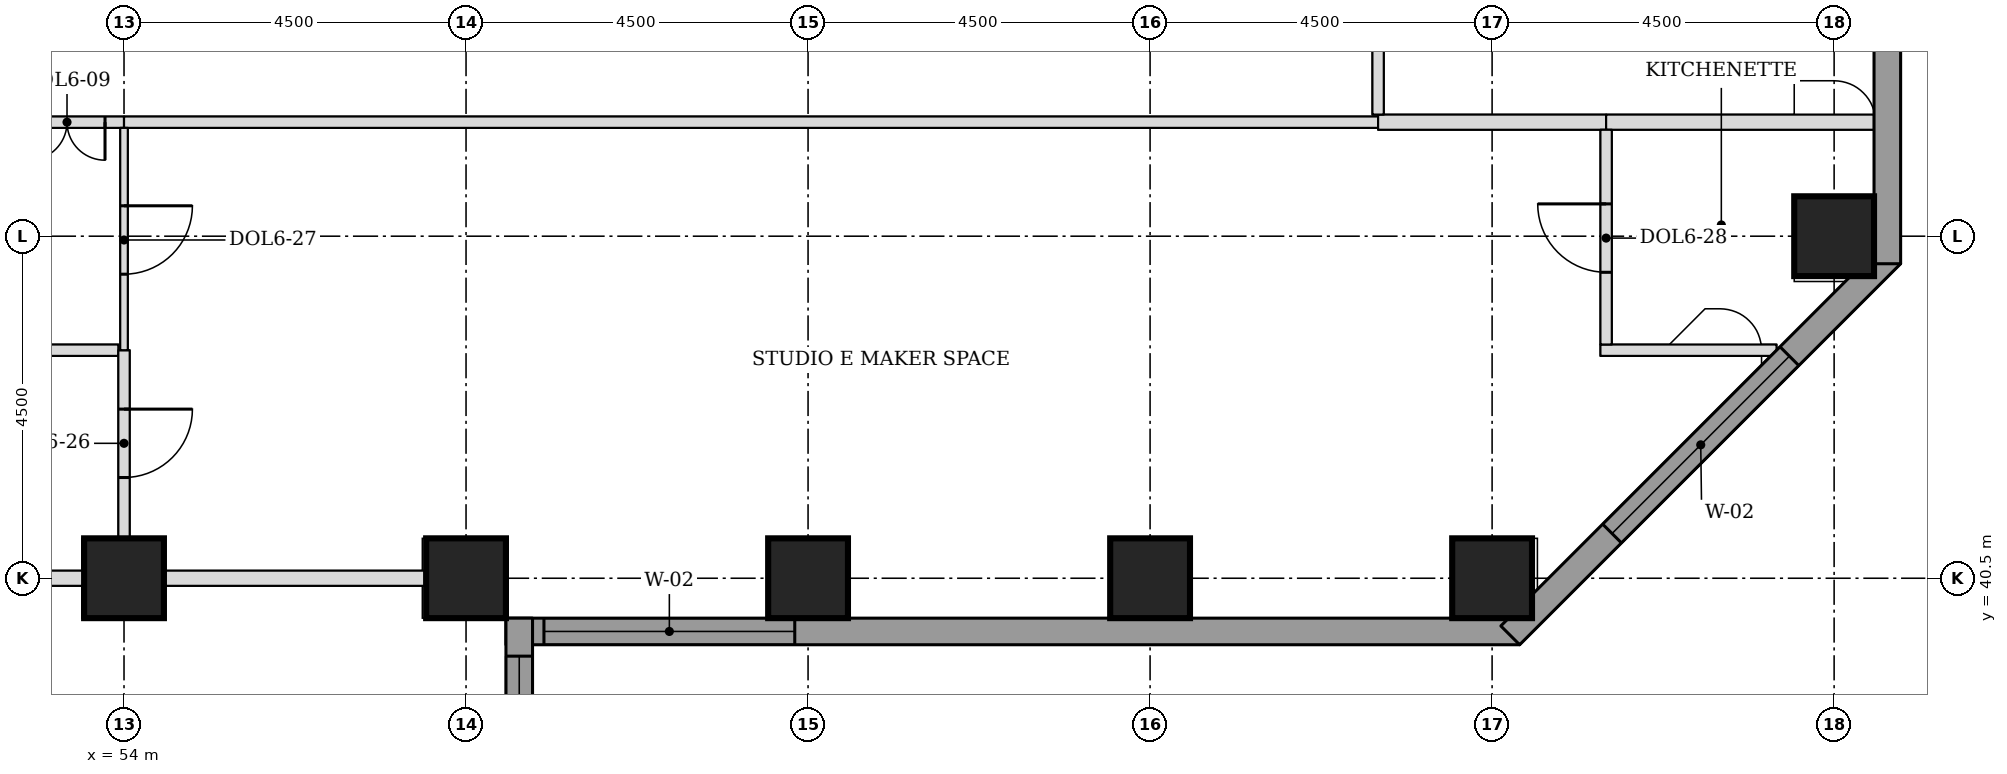
"""IFC4 building model, lengths in metres.
Left out: names, types, materials, properties, quantities, classifications, styles, units other than length and angle.
Written with IfcOpenShell. Run it as: python <this file> out.ifc"""

import sys

from ifc_helpers import new_model, si_unit, direction, frame, frame_2d, origin, origin_2d, place, context, subcontext, project, spatial, rectangle, extrude, element, fill, save


model = new_model("IFC4")
c1 = context("Model", 3, precision=1e-05, world=origin(), true_north=direction((0.0, 1.0)))
c2 = subcontext(c1, "Body", "Model", "MODEL_VIEW")
j1 = project(units=[si_unit("LENGTHUNIT", "METRE"), si_unit("PLANEANGLEUNIT", "RADIAN")], contexts=[c1])
p1 = place(None, origin())
s1 = spatial("IfcSite", under=j1, at=p1, CompositionType="ELEMENT")
p2 = place(p1, origin())
s2 = spatial("IfcBuilding", under=s1, at=p2, CompositionType="ELEMENT")
p3 = place(p2, frame((0.0, 0.0, 115.9)))
s3 = spatial("IfcBuildingStorey", under=s2, at=p3, CompositionType="ELEMENT", Elevation=115.9)
for number, where, z_axis, x_axis in (
    (1, (54.0, 40.5, 0.0), (0.0, 0.0, 1.0), (1.0, 0.0, 0.0)),
    (2, (58.5, 40.5, 0.0), (0.0, 0.0, 1.0), (1.0, 0.0, 0.0)),
    (3, (63.0, 40.5, 0.0), (0.0, 0.0, 1.0), (1.0, 0.0, 0.0)),
    (4, (67.5, 40.5, 0.0), (0.0, 0.0, 1.0), (1.0, 0.0, 0.0)),
    (5, (72.0, 40.5, 0.0), (0.0, 0.0, 1.0), (1.0, 0.0, 0.0)),
    (6, (76.5, 45.0, 0.0), (0.0, 0.0, 1.0), (1.0, 0.0, 0.0)),
):
    element("IfcColumn", number, at=place(p3, frame(where, z_axis=z_axis, x_axis=x_axis)), inside=s3, PredefinedType="COLUMN", context=c2, shape_type="SweptSolid", body=[
        extrude(rectangle(XDim=1.05, YDim=1.05, at=origin_2d()), origin(), (0.0, 0.0, 1.0), 3.7),
    ])
p4 = place(p3, frame((59.025, 39.8, 0.0), z_axis=(0.0, 0.0, 1.0), x_axis=(1.0, 0.0, 0.0)))
e7 = element("IfcWall", 7, at=p4, inside=s3, PredefinedType="STANDARD", context=c2, shape_type="SweptSolid", body=[
    extrude(rectangle(XDim=13.337, YDim=0.35, at=frame_2d((6.669, 0.0))), origin(), (0.0, 0.0, 1.0), 3.525),
])
p5 = place(p4, frame((0.5, 0.0, 0.9)))
e8 = element("IfcOpeningElement", 8, at=p5, cuts=e7, PredefinedType="OPENING", context=c2, shape_type="SweptSolid", body=[
    extrude(rectangle(XDim=3.3, YDim=1.9, at=frame_2d((1.65, 0.95))), frame((0.0, 0.185, 0.0), z_axis=(0.0, -1.0, 0.0), x_axis=(1.0, 0.0, 0.0)), (0.0, 0.0, 1.0), 0.37),
])
p6 = place(p3, frame((72.239, 39.749, 0.0), z_axis=(0.0, 0.0, 1.0), x_axis=(0.707106781187, 0.707106781187, 0.0)))
e9 = element("IfcWall", 9, at=p6, inside=s3, PredefinedType="STANDARD", context=c2, shape_type="SweptSolid", body=[
    extrude(rectangle(XDim=7.089, YDim=0.35, at=frame_2d((3.544, 0.0))), origin(), (0.0, 0.0, 1.0), 3.525),
])
p7 = place(p6, frame((1.894, 0.0, 0.9)))
e10 = element("IfcOpeningElement", 10, at=p7, cuts=e9, PredefinedType="OPENING", context=c2, shape_type="SweptSolid", body=[
    extrude(rectangle(XDim=3.3, YDim=1.9, at=frame_2d((1.65, 0.95))), frame((0.0, 0.185, 0.0), z_axis=(0.0, -1.0, 0.0), x_axis=(1.0, 0.0, 0.0)), (0.0, 0.0, 1.0), 0.37),
])
p8 = place(p3, frame((77.2, 44.638, 0.0), z_axis=(0.0, 0.0, 1.0), x_axis=(0.0, 1.0, 0.0)))
e11 = element("IfcWall", 11, at=p8, inside=s3, PredefinedType="STANDARD", context=c2, shape_type="SweptSolid", body=[
    extrude(rectangle(XDim=32.225, YDim=0.35, at=frame_2d((16.112, 0.0))), origin(), (0.0, 0.0, 1.0), 3.525),
])
p9 = place(p8, frame((5.462, 0.0, 0.9)))
e12 = element("IfcOpeningElement", 12, at=p9, cuts=e11, PredefinedType="OPENING", context=c2, shape_type="SweptSolid", body=[
    extrude(rectangle(XDim=3.3, YDim=1.9, at=frame_2d((1.65, 0.95))), frame((0.0, 0.185, 0.0), z_axis=(0.0, -1.0, 0.0), x_axis=(1.0, 0.0, 0.0)), (0.0, 0.0, 1.0), 0.37),
])
p10 = place(p8, frame((9.962, 0.0, 0.9)))
e13 = element("IfcOpeningElement", 13, at=p10, cuts=e11, PredefinedType="OPENING", context=c2, shape_type="SweptSolid", body=[
    extrude(rectangle(XDim=3.3, YDim=1.9, at=frame_2d((1.65, 0.95))), frame((0.0, 0.185, 0.0), z_axis=(0.0, -1.0, 0.0), x_axis=(1.0, 0.0, 0.0)), (0.0, 0.0, 1.0), 0.37),
])
p11 = place(p8, frame((14.462, 0.0, 0.9)))
e14 = element("IfcOpeningElement", 14, at=p11, cuts=e11, PredefinedType="OPENING", context=c2, shape_type="SweptSolid", body=[
    extrude(rectangle(XDim=3.3, YDim=1.9, at=frame_2d((1.65, 0.95))), frame((0.0, 0.185, 0.0), z_axis=(0.0, -1.0, 0.0), x_axis=(1.0, 0.0, 0.0)), (0.0, 0.0, 1.0), 0.37),
])
p12 = place(p8, frame((18.962, 0.0, 0.9)))
e15 = element("IfcOpeningElement", 15, at=p12, cuts=e11, PredefinedType="OPENING", context=c2, shape_type="SweptSolid", body=[
    extrude(rectangle(XDim=3.3, YDim=1.9, at=frame_2d((1.65, 0.95))), frame((0.0, 0.185, 0.0), z_axis=(0.0, -1.0, 0.0), x_axis=(1.0, 0.0, 0.0)), (0.0, 0.0, 1.0), 0.37),
])
p13 = place(p8, frame((23.462, 0.0, 0.9)))
e16 = element("IfcOpeningElement", 16, at=p13, cuts=e11, PredefinedType="OPENING", context=c2, shape_type="SweptSolid", body=[
    extrude(rectangle(XDim=3.3, YDim=1.9, at=frame_2d((1.65, 0.95))), frame((0.0, 0.185, 0.0), z_axis=(0.0, -1.0, 0.0), x_axis=(1.0, 0.0, 0.0)), (0.0, 0.0, 1.0), 0.37),
])
p14 = place(p3, frame((59.2, 22.138, 0.0), z_axis=(0.0, 0.0, 1.0), x_axis=(0.0, 1.0, 0.0)))
e17 = element("IfcWall", 17, at=p14, inside=s3, PredefinedType="STANDARD", context=c2, shape_type="SweptSolid", body=[
    extrude(rectangle(XDim=17.837, YDim=0.35, at=frame_2d((8.919, 0.0))), origin(), (0.0, 0.0, 1.0), 3.525),
])
p15 = place(p14, frame((5.462, 0.0, 0.9)))
e18 = element("IfcOpeningElement", 18, at=p15, cuts=e17, PredefinedType="OPENING", context=c2, shape_type="SweptSolid", body=[
    extrude(rectangle(XDim=3.3, YDim=1.9, at=frame_2d((1.65, 0.95))), frame((0.0, 0.185, 0.0), z_axis=(0.0, -1.0, 0.0), x_axis=(1.0, 0.0, 0.0)), (0.0, 0.0, 1.0), 0.37),
])
p16 = place(p14, frame((14.037, 0.0, 0.9)))
e19 = element("IfcOpeningElement", 19, at=p16, cuts=e17, PredefinedType="OPENING", context=c2, shape_type="SweptSolid", body=[
    extrude(rectangle(XDim=3.3, YDim=1.9, at=frame_2d((1.65, 0.95))), frame((0.0, 0.185, 0.0), z_axis=(0.0, -1.0, 0.0), x_axis=(1.0, 0.0, 0.0)), (0.0, 0.0, 1.0), 0.37),
])
p17 = place(p3, frame((50.015, 40.5, 0.0), z_axis=(0.0, 0.0, 1.0), x_axis=(1.0, 0.0, 0.0)))
e20 = element("IfcWall", 20, at=p17, inside=s3, PredefinedType="PARTITIONING", context=c2, shape_type="SweptSolid", body=[
    extrude(rectangle(XDim=3.46, YDim=0.2, at=frame_2d((1.73, 0.0))), origin(), (0.0, 0.0, 1.0), 2.8),
])
p18 = place(p3, frame((54.495, 40.5, 0.0), z_axis=(0.0, 0.0, 1.0), x_axis=(1.0, 0.0, 0.0)))
e21 = element("IfcWall", 21, at=p18, inside=s3, PredefinedType="PARTITIONING", context=c2, shape_type="SweptSolid", body=[
    extrude(rectangle(XDim=3.48, YDim=0.2, at=frame_2d((1.74, 0.0))), origin(), (0.0, 0.0, 1.0), 2.8),
])
p19 = place(p3, frame((52.5, 43.5, 0.0), z_axis=(0.0, 0.0, 1.0), x_axis=(1.0, 0.0, 0.0)))
e22 = element("IfcWall", 22, at=p19, inside=s3, PredefinedType="PARTITIONING", context=c2, shape_type="SweptSolid", body=[
    extrude(rectangle(XDim=1.425, YDim=0.15, at=frame_2d((0.712, 0.0))), origin(), (0.0, 0.0, 1.0), 3.55),
])
p20 = place(p3, frame((73.425, 43.5, 0.0), z_axis=(0.0, 0.0, 1.0), x_axis=(1.0, 0.0, 0.0)))
e23 = element("IfcWall", 23, at=p20, inside=s3, PredefinedType="PARTITIONING", context=c2, shape_type="SweptSolid", body=[
    extrude(rectangle(XDim=2.317, YDim=0.15, at=frame_2d((1.159, 0.0))), origin(), (0.0, 0.0, 1.0), 3.55),
])
p21 = place(p3, frame((52.5, 46.5, 0.0), z_axis=(0.0, 0.0, 1.0), x_axis=(1.0, 0.0, 0.0)))
e24 = element("IfcWall", 24, at=p21, inside=s3, PredefinedType="PARTITIONING", context=c2, shape_type="SweptSolid", body=[
    extrude(rectangle(XDim=1.5, YDim=0.15, at=frame_2d((0.75, 0.0))), origin(), (0.0, 0.0, 1.0), 3.55),
])
p22 = place(p21, frame((0.25, 0.0, 0.0)))
e25 = element("IfcOpeningElement", 25, at=p22, cuts=e24, PredefinedType="OPENING", context=c2, shape_type="SweptSolid", body=[
    extrude(rectangle(XDim=1.0, YDim=2.1, at=frame_2d((0.5, 1.05))), frame((0.0, 0.085, 0.0), z_axis=(0.0, -1.0, 0.0), x_axis=(1.0, 0.0, 0.0)), (0.0, 0.0, 1.0), 0.17),
])
p23 = place(p3, frame((54.0, 46.5, 0.0), z_axis=(0.0, 0.0, 1.0), x_axis=(1.0, 0.0, 0.0)))
e26 = element("IfcWall", 26, at=p23, inside=s3, PredefinedType="PARTITIONING", context=c2, shape_type="SweptSolid", body=[
    extrude(rectangle(XDim=16.5, YDim=0.15, at=frame_2d((8.25, 0.0))), origin(), (0.0, 0.0, 1.0), 3.55),
])
p24 = place(p3, frame((70.5, 46.5, 0.0), z_axis=(0.0, 0.0, 1.0), x_axis=(1.0, 0.0, 0.0)))
e27 = element("IfcWall", 27, at=p24, inside=s3, PredefinedType="PARTITIONING", context=c2, shape_type="SweptSolid", body=[
    extrude(rectangle(XDim=3.0, YDim=0.2, at=frame_2d((1.5, 0.0))), origin(), (0.0, 0.0, 1.0), 3.55),
])
p25 = place(p3, frame((73.5, 46.5, 0.0), z_axis=(0.0, 0.0, 1.0), x_axis=(1.0, 0.0, 0.0)))
e28 = element("IfcWall", 28, at=p25, inside=s3, PredefinedType="PARTITIONING", context=c2, shape_type="SweptSolid", body=[
    extrude(rectangle(XDim=3.525, YDim=0.2, at=frame_2d((1.762, 0.0))), origin(), (0.0, 0.0, 1.0), 3.55),
])
p26 = place(p3, frame((54.0, 41.025, 0.0), z_axis=(0.0, 0.0, 1.0), x_axis=(0.0, 1.0, 0.0)))
e29 = element("IfcWall", 29, at=p26, inside=s3, PredefinedType="PARTITIONING", context=c2, shape_type="SweptSolid", body=[
    extrude(rectangle(XDim=2.475, YDim=0.15, at=frame_2d((1.238, 0.0))), origin(), (0.0, 0.0, 1.0), 3.55),
])
p27 = place(p26, frame((0.8, 0.0, 0.0)))
e30 = element("IfcOpeningElement", 30, at=p27, cuts=e29, PredefinedType="OPENING", context=c2, shape_type="SweptSolid", body=[
    extrude(rectangle(XDim=0.9, YDim=2.1, at=frame_2d((0.45, 1.05))), frame((0.0, 0.085, 0.0), z_axis=(0.0, -1.0, 0.0), x_axis=(1.0, 0.0, 0.0)), (0.0, 0.0, 1.0), 0.17),
])
p28 = place(p3, frame((54.0, 43.5, 0.0), z_axis=(0.0, 0.0, 1.0), x_axis=(0.0, 1.0, 0.0)))
e31 = element("IfcWall", 31, at=p28, inside=s3, PredefinedType="PARTITIONING", context=c2, shape_type="SweptSolid", body=[
    extrude(rectangle(XDim=2.925, YDim=0.1, at=frame_2d((1.462, 0.0))), origin(), (0.0, 0.0, 1.0), 3.55),
])
p29 = place(p28, frame((1.0, 0.0, 0.0)))
e32 = element("IfcOpeningElement", 32, at=p29, cuts=e31, PredefinedType="OPENING", context=c2, shape_type="SweptSolid", body=[
    extrude(rectangle(XDim=0.9, YDim=2.1, at=frame_2d((0.45, 1.05))), frame((0.0, 0.06, 0.0), z_axis=(0.0, -1.0, 0.0), x_axis=(1.0, 0.0, 0.0)), (0.0, 0.0, 1.0), 0.12),
])
p30 = place(p3, frame((73.5, 43.575, 0.0), z_axis=(0.0, 0.0, 1.0), x_axis=(0.0, 1.0, 0.0)))
e33 = element("IfcWall", 33, at=p30, inside=s3, PredefinedType="PARTITIONING", context=c2, shape_type="SweptSolid", body=[
    extrude(rectangle(XDim=2.825, YDim=0.15, at=frame_2d((1.413, 0.0))), origin(), (0.0, 0.0, 1.0), 3.55),
])
p31 = place(p30, frame((0.95, 0.0, 0.0)))
e34 = element("IfcOpeningElement", 34, at=p31, cuts=e33, PredefinedType="OPENING", context=c2, shape_type="SweptSolid", body=[
    extrude(rectangle(XDim=0.9, YDim=2.1, at=frame_2d((0.45, 1.05))), frame((0.0, 0.085, 0.0), z_axis=(0.0, -1.0, 0.0), x_axis=(1.0, 0.0, 0.0)), (0.0, 0.0, 1.0), 0.17),
])
p32 = place(p3, frame((70.5, 46.6, 0.0), z_axis=(0.0, 0.0, 1.0), x_axis=(0.0, 1.0, 0.0)))
e35 = element("IfcWall", 35, at=p32, inside=s3, PredefinedType="PARTITIONING", context=c2, shape_type="SweptSolid", body=[
    extrude(rectangle(XDim=13.4, YDim=0.15, at=frame_2d((6.7, 0.0))), origin(), (0.0, 0.0, 1.0), 3.55),
])
p33 = place(p32, frame((6.2, 0.0, 0.0)))
e36 = element("IfcOpeningElement", 36, at=p33, cuts=e35, PredefinedType="OPENING", context=c2, shape_type="SweptSolid", body=[
    extrude(rectangle(XDim=1.0, YDim=2.1, at=frame_2d((0.5, 1.05))), frame((0.0, 0.085, 0.0), z_axis=(0.0, -1.0, 0.0), x_axis=(1.0, 0.0, 0.0)), (0.0, 0.0, 1.0), 0.17),
])
p34 = place(p5, origin())
e37 = element("IfcWindow", 37, at=p34, inside=s3, PartitioningType="SINGLE_PANEL", PredefinedType="WINDOW", context=c2, shape_type="SweptSolid", body=[
    extrude(rectangle(XDim=3.3, YDim=1.9, at=frame_2d((1.65, 0.95))), frame((0.0, 0.085, 0.0), z_axis=(0.0, -1.0, 0.0), x_axis=(1.0, 0.0, 0.0)), (0.0, 0.0, 1.0), 0.06),
])
fill(e8, e37)
p35 = place(p7, origin())
e38 = element("IfcWindow", 38, at=p35, inside=s3, PartitioningType="SINGLE_PANEL", PredefinedType="WINDOW", context=c2, shape_type="SweptSolid", body=[
    extrude(rectangle(XDim=3.3, YDim=1.9, at=frame_2d((1.65, 0.95))), frame((0.0, 0.085, 0.0), z_axis=(0.0, -1.0, 0.0), x_axis=(1.0, 0.0, 0.0)), (0.0, 0.0, 1.0), 0.06),
])
fill(e10, e38)
p36 = place(p16, origin())
e39 = element("IfcWindow", 39, at=p36, inside=s3, PartitioningType="SINGLE_PANEL", PredefinedType="WINDOW", context=c2, shape_type="SweptSolid", body=[
    extrude(rectangle(XDim=3.3, YDim=1.9, at=frame_2d((1.65, 0.95))), frame((0.0, 0.085, 0.0), z_axis=(0.0, -1.0, 0.0), x_axis=(1.0, 0.0, 0.0)), (0.0, 0.0, 1.0), 0.06),
])
fill(e19, e39)
p37 = place(p22, frame((1.0, 0.0, 0.0), z_axis=(0.0, 0.0, 1.0), x_axis=(-1.0, 0.0, 0.0)))
e40 = element("IfcDoor", 40, at=p37, inside=s3, OperationType="DOUBLE_DOOR_SINGLE_SWING", PredefinedType="DOOR", context=c2, shape_type="SweptSolid", body=[
    extrude(rectangle(XDim=1.0, YDim=2.1, at=frame_2d((0.5, 1.05))), frame((0.0, 0.025, 0.0), z_axis=(0.0, -1.0, 0.0), x_axis=(1.0, 0.0, 0.0)), (0.0, 0.0, 1.0), 0.05),
])
fill(e25, e40)
p38 = place(p29, frame((0.9, 0.0, 0.0), z_axis=(0.0, 0.0, 1.0), x_axis=(-1.0, 0.0, 0.0)))
e41 = element("IfcDoor", 41, at=p38, inside=s3, OperationType="SINGLE_SWING_LEFT", PredefinedType="DOOR", context=c2, shape_type="SweptSolid", body=[
    extrude(rectangle(XDim=0.9, YDim=2.1, at=frame_2d((0.45, 1.05))), frame((0.0, 0.025, 0.0), z_axis=(0.0, -1.0, 0.0), x_axis=(1.0, 0.0, 0.0)), (0.0, 0.0, 1.0), 0.05),
])
fill(e32, e41)
p39 = place(p31, origin())
e42 = element("IfcDoor", 42, at=p39, inside=s3, OperationType="SINGLE_SWING_RIGHT", PredefinedType="DOOR", context=c2, shape_type="SweptSolid", body=[
    extrude(rectangle(XDim=0.9, YDim=2.1, at=frame_2d((0.45, 1.05))), frame((0.0, 0.025, 0.0), z_axis=(0.0, -1.0, 0.0), x_axis=(1.0, 0.0, 0.0)), (0.0, 0.0, 1.0), 0.05),
])
fill(e34, e42)
p40 = place(p27, frame((0.9, 0.0, 0.0), z_axis=(0.0, 0.0, 1.0), x_axis=(-1.0, 0.0, 0.0)))
e43 = element("IfcDoor", 43, at=p40, inside=s3, OperationType="SINGLE_SWING_LEFT", PredefinedType="DOOR", context=c2, shape_type="SweptSolid", body=[
    extrude(rectangle(XDim=0.9, YDim=2.1, at=frame_2d((0.45, 1.05))), frame((0.0, 0.025, 0.0), z_axis=(0.0, -1.0, 0.0), x_axis=(1.0, 0.0, 0.0)), (0.0, 0.0, 1.0), 0.05),
])
fill(e30, e43)
save(model, sys.argv[1])
